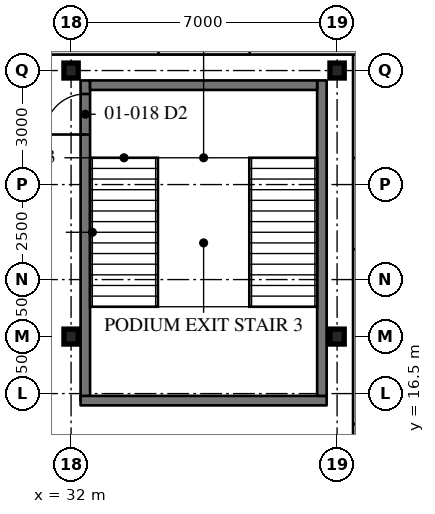
"""IFC4 building model, lengths in metres.
Left out: names, types, materials, properties, quantities, classifications, styles, units other than length and angle.
Written with IfcOpenShell. Run it as: python <this file> out.ifc"""

import sys

from ifc_helpers import new_model, si_unit, direction, frame, frame_2d, origin, origin_2d, place, context, subcontext, project, spatial, rectangle, i_section, extrude, element, fill, save


model = new_model("IFC4")
c1 = context("Model", 3, precision=1e-05, world=origin(), true_north=direction((0.0, 1.0)))
c2 = subcontext(c1, "Body", "Model", "MODEL_VIEW")
j1 = project(units=[si_unit("LENGTHUNIT", "METRE"), si_unit("PLANEANGLEUNIT", "RADIAN")], contexts=[c1])
p1 = place(None, origin())
s1 = spatial("IfcSite", under=j1, at=p1, CompositionType="ELEMENT")
p2 = place(p1, origin())
s2 = spatial("IfcBuilding", under=s1, at=p2, CompositionType="ELEMENT")
p3 = place(p2, frame((0.0, 0.0, 6.0)))
s3 = spatial("IfcBuildingStorey", under=s2, at=p3, CompositionType="ELEMENT", Elevation=6.0)
for number, where, z_axis, x_axis in (
    (1, (32.0, 18.0, 0.0), (0.0, 0.0, 1.0), (0.0, 1.0, 0.0)),
    (2, (32.0, 25.0, 0.0), (0.0, 0.0, 1.0), (0.0, 1.0, 0.0)),
    (3, (39.0, 18.0, 0.0), (0.0, 0.0, 1.0), (0.0, 1.0, 0.0)),
    (4, (39.0, 25.0, 0.0), (0.0, 0.0, 1.0), (0.0, 1.0, 0.0)),
):
    element("IfcColumn", number, at=place(p3, frame(where, z_axis=z_axis, x_axis=x_axis)), inside=s3, PredefinedType="COLUMN", context=c2, shape_type="SweptSolid", body=[
        extrude(i_section(OverallWidth=0.394, OverallDepth=0.376, WebThickness=0.017, FlangeThickness=0.028, at=origin_2d()), origin(), (0.0, 0.0, 1.0), 5.0),
    ])
p4 = place(p3, frame((39.62, -25.42, -0.19), z_axis=(0.0, 0.0, 1.0), x_axis=(0.0, 1.0, 0.0)))
e5 = element("IfcWall", 5, at=p4, inside=s3, PredefinedType="SOLIDWALL", context=c2, shape_type="SweptSolid", body=[
    extrude(rectangle(XDim=50.84, YDim=0.4, at=frame_2d((25.42, 0.0))), origin(), (0.0, 0.0, 1.0), 5.0),
])
p5 = place(p4, frame((2.72, 0.0, 1.09)))
e6 = element("IfcOpeningElement", 6, at=p5, cuts=e5, PredefinedType="OPENING", context=c2, shape_type="SweptSolid", body=[
    extrude(rectangle(XDim=2.4, YDim=2.7, at=frame_2d((1.2, 1.35))), frame((0.0, 0.21, 0.0), z_axis=(0.0, -1.0, 0.0), x_axis=(1.0, 0.0, 0.0)), (0.0, 0.0, 1.0), 0.42),
])
p6 = place(p4, frame((9.72, 0.0, 1.09)))
e7 = element("IfcOpeningElement", 7, at=p6, cuts=e5, PredefinedType="OPENING", context=c2, shape_type="SweptSolid", body=[
    extrude(rectangle(XDim=2.4, YDim=2.7, at=frame_2d((1.2, 1.35))), frame((0.0, 0.21, 0.0), z_axis=(0.0, -1.0, 0.0), x_axis=(1.0, 0.0, 0.0)), (0.0, 0.0, 1.0), 0.42),
])
p7 = place(p4, frame((18.72, 0.0, 1.09)))
e8 = element("IfcOpeningElement", 8, at=p7, cuts=e5, PredefinedType="OPENING", context=c2, shape_type="SweptSolid", body=[
    extrude(rectangle(XDim=2.4, YDim=2.7, at=frame_2d((1.2, 1.35))), frame((0.0, 0.21, 0.0), z_axis=(0.0, -1.0, 0.0), x_axis=(1.0, 0.0, 0.0)), (0.0, 0.0, 1.0), 0.42),
])
p8 = place(p4, frame((29.72, 0.0, 1.09)))
e9 = element("IfcOpeningElement", 9, at=p8, cuts=e5, PredefinedType="OPENING", context=c2, shape_type="SweptSolid", body=[
    extrude(rectangle(XDim=2.4, YDim=2.7, at=frame_2d((1.2, 1.35))), frame((0.0, 0.21, 0.0), z_axis=(0.0, -1.0, 0.0), x_axis=(1.0, 0.0, 0.0)), (0.0, 0.0, 1.0), 0.42),
])
p9 = place(p4, frame((38.72, 0.0, 1.09)))
e10 = element("IfcOpeningElement", 10, at=p9, cuts=e5, PredefinedType="OPENING", context=c2, shape_type="SweptSolid", body=[
    extrude(rectangle(XDim=2.4, YDim=2.7, at=frame_2d((1.2, 1.35))), frame((0.0, 0.21, 0.0), z_axis=(0.0, -1.0, 0.0), x_axis=(1.0, 0.0, 0.0)), (0.0, 0.0, 1.0), 0.42),
])
p10 = place(p4, frame((45.72, 0.0, 1.09)))
e11 = element("IfcOpeningElement", 11, at=p10, cuts=e5, PredefinedType="OPENING", context=c2, shape_type="SweptSolid", body=[
    extrude(rectangle(XDim=2.4, YDim=2.7, at=frame_2d((1.2, 1.35))), frame((0.0, 0.21, 0.0), z_axis=(0.0, -1.0, 0.0), x_axis=(1.0, 0.0, 0.0)), (0.0, 0.0, 1.0), 0.42),
])
p11 = place(p3, frame((39.82, 25.62, -0.19), z_axis=(0.0, 0.0, 1.0), x_axis=(-1.0, 0.0, 0.0)))
e12 = element("IfcWall", 12, at=p11, inside=s3, PredefinedType="SOLIDWALL", context=c2, shape_type="SweptSolid", body=[
    extrude(rectangle(XDim=79.64, YDim=0.4, at=frame_2d((39.82, 0.0))), origin(), (0.0, 0.0, 1.0), 5.0),
])
p12 = place(p11, frame((74.12, 0.0, 1.09)))
e13 = element("IfcOpeningElement", 13, at=p12, cuts=e12, PredefinedType="OPENING", context=c2, shape_type="SweptSolid", body=[
    extrude(rectangle(XDim=2.4, YDim=2.7, at=frame_2d((1.2, 1.35))), frame((0.0, 0.21, 0.0), z_axis=(0.0, -1.0, 0.0), x_axis=(1.0, 0.0, 0.0)), (0.0, 0.0, 1.0), 0.42),
])
p13 = place(p11, frame((67.12, 0.0, 1.09)))
e14 = element("IfcOpeningElement", 14, at=p13, cuts=e12, PredefinedType="OPENING", context=c2, shape_type="SweptSolid", body=[
    extrude(rectangle(XDim=2.4, YDim=2.7, at=frame_2d((1.2, 1.35))), frame((0.0, 0.21, 0.0), z_axis=(0.0, -1.0, 0.0), x_axis=(1.0, 0.0, 0.0)), (0.0, 0.0, 1.0), 0.42),
])
p14 = place(p11, frame((60.12, 0.0, 1.09)))
e15 = element("IfcOpeningElement", 15, at=p14, cuts=e12, PredefinedType="OPENING", context=c2, shape_type="SweptSolid", body=[
    extrude(rectangle(XDim=2.4, YDim=2.7, at=frame_2d((1.2, 1.35))), frame((0.0, 0.21, 0.0), z_axis=(0.0, -1.0, 0.0), x_axis=(1.0, 0.0, 0.0)), (0.0, 0.0, 1.0), 0.42),
])
p15 = place(p11, frame((53.12, 0.0, 1.09)))
e16 = element("IfcOpeningElement", 16, at=p15, cuts=e12, PredefinedType="OPENING", context=c2, shape_type="SweptSolid", body=[
    extrude(rectangle(XDim=2.4, YDim=2.7, at=frame_2d((1.2, 1.35))), frame((0.0, 0.21, 0.0), z_axis=(0.0, -1.0, 0.0), x_axis=(1.0, 0.0, 0.0)), (0.0, 0.0, 1.0), 0.42),
])
p16 = place(p11, frame((44.12, 0.0, 1.09)))
e17 = element("IfcOpeningElement", 17, at=p16, cuts=e12, PredefinedType="OPENING", context=c2, shape_type="SweptSolid", body=[
    extrude(rectangle(XDim=2.4, YDim=2.7, at=frame_2d((1.2, 1.35))), frame((0.0, 0.21, 0.0), z_axis=(0.0, -1.0, 0.0), x_axis=(1.0, 0.0, 0.0)), (0.0, 0.0, 1.0), 0.42),
])
p17 = place(p11, frame((33.12, 0.0, 1.09)))
e18 = element("IfcOpeningElement", 18, at=p17, cuts=e12, PredefinedType="OPENING", context=c2, shape_type="SweptSolid", body=[
    extrude(rectangle(XDim=2.4, YDim=2.7, at=frame_2d((1.2, 1.35))), frame((0.0, 0.21, 0.0), z_axis=(0.0, -1.0, 0.0), x_axis=(1.0, 0.0, 0.0)), (0.0, 0.0, 1.0), 0.42),
])
p18 = place(p11, frame((24.12, 0.0, 1.09)))
e19 = element("IfcOpeningElement", 19, at=p18, cuts=e12, PredefinedType="OPENING", context=c2, shape_type="SweptSolid", body=[
    extrude(rectangle(XDim=2.4, YDim=2.7, at=frame_2d((1.2, 1.35))), frame((0.0, 0.21, 0.0), z_axis=(0.0, -1.0, 0.0), x_axis=(1.0, 0.0, 0.0)), (0.0, 0.0, 1.0), 0.42),
])
p19 = place(p11, frame((17.12, 0.0, 1.09)))
e20 = element("IfcOpeningElement", 20, at=p19, cuts=e12, PredefinedType="OPENING", context=c2, shape_type="SweptSolid", body=[
    extrude(rectangle(XDim=2.4, YDim=2.7, at=frame_2d((1.2, 1.35))), frame((0.0, 0.21, 0.0), z_axis=(0.0, -1.0, 0.0), x_axis=(1.0, 0.0, 0.0)), (0.0, 0.0, 1.0), 0.42),
])
p20 = place(p11, frame((10.12, 0.0, 1.09)))
e21 = element("IfcOpeningElement", 21, at=p20, cuts=e12, PredefinedType="OPENING", context=c2, shape_type="SweptSolid", body=[
    extrude(rectangle(XDim=2.4, YDim=2.7, at=frame_2d((1.2, 1.35))), frame((0.0, 0.21, 0.0), z_axis=(0.0, -1.0, 0.0), x_axis=(1.0, 0.0, 0.0)), (0.0, 0.0, 1.0), 0.42),
])
p21 = place(p11, frame((3.12, 0.0, 1.09)))
e22 = element("IfcOpeningElement", 22, at=p21, cuts=e12, PredefinedType="OPENING", context=c2, shape_type="SweptSolid", body=[
    extrude(rectangle(XDim=2.4, YDim=2.7, at=frame_2d((1.2, 1.35))), frame((0.0, 0.21, 0.0), z_axis=(0.0, -1.0, 0.0), x_axis=(1.0, 0.0, 0.0)), (0.0, 0.0, 1.0), 0.42),
])
p22 = place(p3, frame((32.375, 16.315, 0.0), z_axis=(0.0, 0.0, 1.0), x_axis=(0.0, 1.0, 0.0)))
e23 = element("IfcWall", 23, at=p22, inside=s3, PredefinedType="SOLIDWALL", context=c2, shape_type="SweptSolid", body=[
    extrude(rectangle(XDim=8.425, YDim=0.25, at=frame_2d((4.212, 0.0))), origin(), (0.0, 0.0, 1.0), 4.81),
])
p23 = place(p22, frame((7.001, 0.0, 0.0)))
e24 = element("IfcOpeningElement", 24, at=p23, cuts=e23, PredefinedType="OPENING", context=c2, shape_type="SweptSolid", body=[
    extrude(rectangle(XDim=1.067, YDim=2.134, at=frame_2d((0.533, 1.067))), frame((0.0, 0.135, 0.0), z_axis=(0.0, -1.0, 0.0), x_axis=(1.0, 0.0, 0.0)), (0.0, 0.0, 1.0), 0.27),
])
p24 = place(p3, frame((32.25, 16.315, 0.0), z_axis=(0.0, 0.0, 1.0), x_axis=(1.0, 0.0, 0.0)))
e25 = element("IfcWall", 25, at=p24, inside=s3, PredefinedType="SOLIDWALL", context=c2, shape_type="SweptSolid", body=[
    extrude(rectangle(XDim=6.475, YDim=0.25, at=frame_2d((3.238, 0.0))), origin(), (0.0, 0.0, 1.0), 4.81),
])
p25 = place(p3, frame((38.6, 16.44, 0.0), z_axis=(0.0, 0.0, 1.0), x_axis=(0.0, 1.0, 0.0)))
e26 = element("IfcWall", 26, at=p25, inside=s3, PredefinedType="SOLIDWALL", context=c2, shape_type="SweptSolid", body=[
    extrude(rectangle(XDim=8.3, YDim=0.25, at=frame_2d((4.15, 0.0))), origin(), (0.0, 0.0, 1.0), 4.81),
])
p26 = place(p3, frame((32.5, 24.615, 0.0), z_axis=(0.0, 0.0, 1.0), x_axis=(1.0, 0.0, 0.0)))
e27 = element("IfcWall", 27, at=p26, inside=s3, PredefinedType="SOLIDWALL", context=c2, shape_type="SweptSolid", body=[
    extrude(rectangle(XDim=5.975, YDim=0.25, at=frame_2d((2.988, 0.0))), origin(), (0.0, 0.0, 1.0), 4.81),
])
p27 = place(p23, origin())
e28 = element("IfcDoor", 28, at=p27, inside=s3, OperationType="SINGLE_SWING_LEFT", PredefinedType="DOOR", context=c2, shape_type="SweptSolid", body=[
    extrude(rectangle(XDim=1.067, YDim=2.134, at=frame_2d((0.533, 1.067))), frame((0.0, 0.025, 0.0), z_axis=(0.0, -1.0, 0.0), x_axis=(1.0, 0.0, 0.0)), (0.0, 0.0, 1.0), 0.05),
])
fill(e24, e28)
save(model, sys.argv[1])
